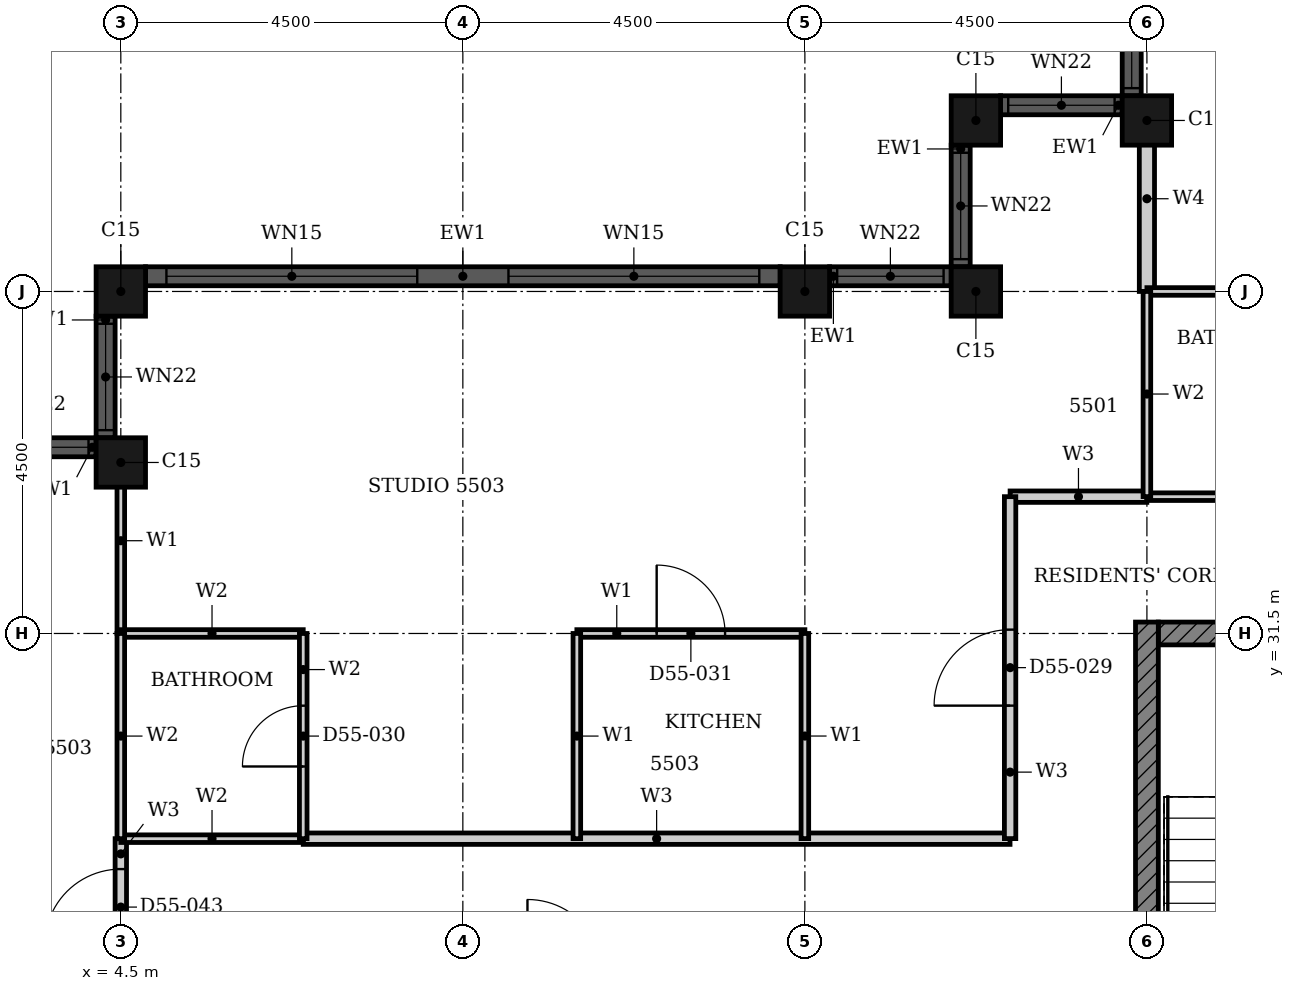
"""IFC4 building model, lengths in metres.
Left out: names, types, materials, properties, quantities, classifications, styles, units other than length and angle.
Written with IfcOpenShell. Run it as: python <this file> out.ifc"""

import sys

from ifc_helpers import new_model, si_unit, direction, frame, frame_2d, origin, origin_2d, place, context, subcontext, project, spatial, rectangle, hollow_rectangle, extrude, element, fill, save


model = new_model("IFC4")
c1 = context("Model", 3, precision=1e-05, world=origin(), true_north=direction((0.0, 1.0)))
c2 = subcontext(c1, "Body", "Model", "MODEL_VIEW")
j1 = project(units=[si_unit("LENGTHUNIT", "METRE"), si_unit("PLANEANGLEUNIT", "RADIAN")], contexts=[c1])
p1 = place(None, origin())
s1 = spatial("IfcSite", under=j1, at=p1, CompositionType="ELEMENT")
p2 = place(p1, origin())
s2 = spatial("IfcBuilding", under=s1, at=p2, CompositionType="ELEMENT")
p3 = place(p2, frame((0.0, 0.0, 218.3)))
s3 = spatial("IfcBuildingStorey", under=s2, at=p3, CompositionType="ELEMENT", Elevation=218.3)
for number, where, z_axis, x_axis in (
    (1, (18.0, 38.25, 0.0), (0.0, 0.0, 1.0), (1.0, 0.0, 0.0)),
    (2, (15.75, 38.25, 0.0), (0.0, 0.0, 1.0), (1.0, 0.0, 0.0)),
    (3, (15.75, 36.0, 0.0), (0.0, 0.0, 1.0), (1.0, 0.0, 0.0)),
    (4, (13.5, 36.0, 0.0), (0.0, 0.0, 1.0), (1.0, 0.0, 0.0)),
    (5, (4.5, 36.0, 0.0), (0.0, 0.0, 1.0), (1.0, 0.0, 0.0)),
    (6, (4.5, 33.75, 0.0), (0.0, 0.0, 1.0), (1.0, 0.0, 0.0)),
):
    element("IfcColumn", number, at=place(p3, frame(where, z_axis=z_axis, x_axis=x_axis)), inside=s3, PredefinedType="COLUMN", context=c2, shape_type="SweptSolid", body=[
        extrude(hollow_rectangle(XDim=0.65, YDim=0.65, WallThickness=0.021, at=origin_2d()), origin(), (0.0, 0.0, 1.0), 3.7),
    ])
p4 = place(p3, frame((17.8, 40.175, 0.0), z_axis=(0.0, 0.0, 1.0), x_axis=(0.0, -1.0, 0.0)))
e7 = element("IfcWall", 7, at=p4, inside=s3, PredefinedType="SOLIDWALL", context=c2, shape_type="SweptSolid", body=[
    extrude(rectangle(XDim=1.6, YDim=0.25, at=frame_2d((0.8, 0.0))), origin(), (0.0, 0.0, 1.0), 3.7),
])
p5 = place(p4, frame((0.1, 0.0, 0.9)))
e8 = element("IfcOpeningElement", 8, at=p5, cuts=e7, PredefinedType="OPENING", context=c2, shape_type="SweptSolid", body=[
    extrude(rectangle(XDim=1.4, YDim=1.85, at=frame_2d((0.7, 0.925))), frame((0.0, 0.135, 0.0), z_axis=(0.0, -1.0, 0.0), x_axis=(1.0, 0.0, 0.0)), (0.0, 0.0, 1.0), 0.27),
])
p6 = place(p3, frame((17.675, 38.45, 0.0), z_axis=(0.0, 0.0, 1.0), x_axis=(-1.0, 0.0, 0.0)))
e9 = element("IfcWall", 9, at=p6, inside=s3, PredefinedType="SOLIDWALL", context=c2, shape_type="SweptSolid", body=[
    extrude(rectangle(XDim=1.6, YDim=0.25, at=frame_2d((0.8, 0.0))), origin(), (0.0, 0.0, 1.0), 3.7),
])
p7 = place(p6, frame((0.1, 0.0, 0.9)))
e10 = element("IfcOpeningElement", 10, at=p7, cuts=e9, PredefinedType="OPENING", context=c2, shape_type="SweptSolid", body=[
    extrude(rectangle(XDim=1.4, YDim=1.85, at=frame_2d((0.7, 0.925))), frame((0.0, 0.135, 0.0), z_axis=(0.0, -1.0, 0.0), x_axis=(1.0, 0.0, 0.0)), (0.0, 0.0, 1.0), 0.27),
])
p8 = place(p3, frame((15.55, 37.925, 0.0), z_axis=(0.0, 0.0, 1.0), x_axis=(0.0, -1.0, 0.0)))
e11 = element("IfcWall", 11, at=p8, inside=s3, PredefinedType="SOLIDWALL", context=c2, shape_type="SweptSolid", body=[
    extrude(rectangle(XDim=1.6, YDim=0.25, at=frame_2d((0.8, 0.0))), origin(), (0.0, 0.0, 1.0), 3.7),
])
p9 = place(p8, frame((0.1, 0.0, 0.9)))
e12 = element("IfcOpeningElement", 12, at=p9, cuts=e11, PredefinedType="OPENING", context=c2, shape_type="SweptSolid", body=[
    extrude(rectangle(XDim=1.4, YDim=1.85, at=frame_2d((0.7, 0.925))), frame((0.0, 0.135, 0.0), z_axis=(0.0, -1.0, 0.0), x_axis=(1.0, 0.0, 0.0)), (0.0, 0.0, 1.0), 0.27),
])
p10 = place(p3, frame((15.425, 36.2, 0.0), z_axis=(0.0, 0.0, 1.0), x_axis=(-1.0, 0.0, 0.0)))
e13 = element("IfcWall", 13, at=p10, inside=s3, PredefinedType="SOLIDWALL", context=c2, shape_type="SweptSolid", body=[
    extrude(rectangle(XDim=1.6, YDim=0.25, at=frame_2d((0.8, 0.0))), origin(), (0.0, 0.0, 1.0), 3.7),
])
p11 = place(p10, frame((0.1, 0.0, 0.9)))
e14 = element("IfcOpeningElement", 14, at=p11, cuts=e13, PredefinedType="OPENING", context=c2, shape_type="SweptSolid", body=[
    extrude(rectangle(XDim=1.4, YDim=1.85, at=frame_2d((0.7, 0.925))), frame((0.0, 0.135, 0.0), z_axis=(0.0, -1.0, 0.0), x_axis=(1.0, 0.0, 0.0)), (0.0, 0.0, 1.0), 0.27),
])
p12 = place(p3, frame((13.175, 36.2, 0.0), z_axis=(0.0, 0.0, 1.0), x_axis=(-1.0, 0.0, 0.0)))
e15 = element("IfcWall", 15, at=p12, inside=s3, PredefinedType="SOLIDWALL", context=c2, shape_type="SweptSolid", body=[
    extrude(rectangle(XDim=8.35, YDim=0.25, at=frame_2d((4.175, 0.0))), origin(), (0.0, 0.0, 1.0), 3.7),
])
p13 = place(p12, frame((0.275, 0.0, 0.45)))
e16 = element("IfcOpeningElement", 16, at=p13, cuts=e15, PredefinedType="OPENING", context=c2, shape_type="SweptSolid", body=[
    extrude(rectangle(XDim=3.3, YDim=2.3, at=frame_2d((1.65, 1.15))), frame((0.0, 0.135, 0.0), z_axis=(0.0, -1.0, 0.0), x_axis=(1.0, 0.0, 0.0)), (0.0, 0.0, 1.0), 0.27),
])
p14 = place(p12, frame((4.775, 0.0, 0.45)))
e17 = element("IfcOpeningElement", 17, at=p14, cuts=e15, PredefinedType="OPENING", context=c2, shape_type="SweptSolid", body=[
    extrude(rectangle(XDim=3.3, YDim=2.3, at=frame_2d((1.65, 1.15))), frame((0.0, 0.135, 0.0), z_axis=(0.0, -1.0, 0.0), x_axis=(1.0, 0.0, 0.0)), (0.0, 0.0, 1.0), 0.27),
])
p15 = place(p3, frame((4.3, 35.675, 0.0), z_axis=(0.0, 0.0, 1.0), x_axis=(0.0, -1.0, 0.0)))
e18 = element("IfcWall", 18, at=p15, inside=s3, PredefinedType="SOLIDWALL", context=c2, shape_type="SweptSolid", body=[
    extrude(rectangle(XDim=1.6, YDim=0.25, at=frame_2d((0.8, 0.0))), origin(), (0.0, 0.0, 1.0), 3.7),
])
p16 = place(p15, frame((0.1, 0.0, 0.9)))
e19 = element("IfcOpeningElement", 19, at=p16, cuts=e18, PredefinedType="OPENING", context=c2, shape_type="SweptSolid", body=[
    extrude(rectangle(XDim=1.4, YDim=1.85, at=frame_2d((0.7, 0.925))), frame((0.0, 0.135, 0.0), z_axis=(0.0, -1.0, 0.0), x_axis=(1.0, 0.0, 0.0)), (0.0, 0.0, 1.0), 0.27),
])
p17 = place(p3, frame((4.175, 33.95, 0.0), z_axis=(0.0, 0.0, 1.0), x_axis=(-1.0, 0.0, 0.0)))
e20 = element("IfcWall", 20, at=p17, inside=s3, PredefinedType="SOLIDWALL", context=c2, shape_type="SweptSolid", body=[
    extrude(rectangle(XDim=1.6, YDim=0.25, at=frame_2d((0.8, 0.0))), origin(), (0.0, 0.0, 1.0), 3.7),
])
p18 = place(p17, frame((0.1, 0.0, 0.9)))
e21 = element("IfcOpeningElement", 21, at=p18, cuts=e20, PredefinedType="OPENING", context=c2, shape_type="SweptSolid", body=[
    extrude(rectangle(XDim=1.4, YDim=1.85, at=frame_2d((0.7, 0.925))), frame((0.0, 0.135, 0.0), z_axis=(0.0, -1.0, 0.0), x_axis=(1.0, 0.0, 0.0)), (0.0, 0.0, 1.0), 0.27),
])
p19 = place(p3, frame((18.15, 31.5, 0.0), z_axis=(0.0, 0.0, 1.0), x_axis=(1.0, 0.0, 0.0)))
e22 = element("IfcWall", 22, at=p19, inside=s3, PredefinedType="SHEAR", context=c2, shape_type="SweptSolid", body=[
    extrude(rectangle(XDim=9.368, YDim=0.3, at=frame_2d((4.684, 0.0))), origin(), (0.0, 0.0, 1.0), 3.4),
])
p20 = place(p19, frame((4.736, 0.0, 0.0)))
e23 = element("IfcOpeningElement", 23, at=p20, cuts=e22, PredefinedType="OPENING", context=c2, shape_type="SweptSolid", body=[
    extrude(rectangle(XDim=1.8, YDim=2.1, at=frame_2d((0.9, 1.05))), frame((0.0, 0.16, 0.0), z_axis=(0.0, -1.0, 0.0), x_axis=(1.0, 0.0, 0.0)), (0.0, 0.0, 1.0), 0.32),
])
p21 = place(p3, frame((18.0, 22.35, 0.0), z_axis=(0.0, 0.0, 1.0), x_axis=(0.0, 1.0, 0.0)))
e24 = element("IfcWall", 24, at=p21, inside=s3, PredefinedType="SHEAR", context=c2, shape_type="SweptSolid", body=[
    extrude(rectangle(XDim=9.3, YDim=0.3, at=frame_2d((4.65, 0.0))), origin(), (0.0, 0.0, 1.0), 3.4),
])
p22 = place(p3, frame((6.9, 28.8, 0.0), z_axis=(0.0, 0.0, 1.0), x_axis=(1.0, 0.0, 0.0)))
e25 = element("IfcWall", 25, at=p22, inside=s3, PredefinedType="PARTITIONING", context=c2, shape_type="SweptSolid", body=[
    extrude(rectangle(XDim=9.299, YDim=0.15, at=frame_2d((4.649, 0.0))), origin(), (0.0, 0.0, 1.0), 3.4),
])
p23 = place(p3, frame((16.2, 33.3, 0.0), z_axis=(0.0, 0.0, 1.0), x_axis=(1.0, 0.0, 0.0)))
e26 = element("IfcWall", 26, at=p23, inside=s3, PredefinedType="PARTITIONING", context=c2, shape_type="SweptSolid", body=[
    extrude(rectangle(XDim=1.799, YDim=0.15, at=frame_2d((0.899, 0.0))), origin(), (0.0, 0.0, 1.0), 3.4),
])
p24 = place(p3, frame((16.2, 28.801, 0.0), z_axis=(0.0, 0.0, 1.0), x_axis=(0.0, 1.0, 0.0)))
e27 = element("IfcWall", 27, at=p24, inside=s3, PredefinedType="PARTITIONING", context=c2, shape_type="SweptSolid", body=[
    extrude(rectangle(XDim=4.499, YDim=0.15, at=frame_2d((2.25, 0.0))), origin(), (0.0, 0.0, 1.0), 3.4),
])
p25 = place(p24, frame((1.75, 0.0, 0.0)))
e28 = element("IfcOpeningElement", 28, at=p25, cuts=e27, PredefinedType="OPENING", context=c2, shape_type="SweptSolid", body=[
    extrude(rectangle(XDim=1.0, YDim=2.2, at=frame_2d((0.5, 1.1))), frame((0.0, 0.085, 0.0), z_axis=(0.0, -1.0, 0.0), x_axis=(1.0, 0.0, 0.0)), (0.0, 0.0, 1.0), 0.17),
])
p26 = place(p3, frame((4.5, 27.0, 0.0), z_axis=(0.0, 0.0, 1.0), x_axis=(0.0, 1.0, 0.0)))
e29 = element("IfcWall", 29, at=p26, inside=s3, PredefinedType="PARTITIONING", context=c2, shape_type="SweptSolid", body=[
    extrude(rectangle(XDim=1.8, YDim=0.15, at=frame_2d((0.9, 0.0))), origin(), (0.0, 0.0, 1.0), 3.4),
])
p27 = place(p26, frame((0.4, 0.0, 0.0)))
e30 = element("IfcOpeningElement", 30, at=p27, cuts=e29, PredefinedType="OPENING", context=c2, shape_type="SweptSolid", body=[
    extrude(rectangle(XDim=1.0, YDim=2.1, at=frame_2d((0.5, 1.05))), frame((0.0, 0.085, 0.0), z_axis=(0.0, -1.0, 0.0), x_axis=(1.0, 0.0, 0.0)), (0.0, 0.0, 1.0), 0.17),
])
p28 = place(p3, frame((10.5, 31.5, 0.0), z_axis=(0.0, 0.0, 1.0), x_axis=(1.0, 0.0, 0.0)))
e31 = element("IfcWall", 31, at=p28, inside=s3, PredefinedType="PARTITIONING", context=c2, shape_type="SweptSolid", body=[
    extrude(rectangle(XDim=3.0, YDim=0.1, at=frame_2d((1.5, 0.0))), origin(), (0.0, 0.0, 1.0), 2.68),
])
p29 = place(p28, frame((1.05, 0.0, 0.0)))
e32 = element("IfcOpeningElement", 32, at=p29, cuts=e31, PredefinedType="OPENING", context=c2, shape_type="SweptSolid", body=[
    extrude(rectangle(XDim=0.9, YDim=2.1, at=frame_2d((0.45, 1.05))), frame((0.0, 0.06, 0.0), z_axis=(0.0, -1.0, 0.0), x_axis=(1.0, 0.0, 0.0)), (0.0, 0.0, 1.0), 0.12),
])
p30 = place(p3, frame((10.5, 28.8, 0.0), z_axis=(0.0, 0.0, 1.0), x_axis=(0.0, 1.0, 0.0)))
e33 = element("IfcWall", 33, at=p30, inside=s3, PredefinedType="PARTITIONING", context=c2, shape_type="SweptSolid", body=[
    extrude(rectangle(XDim=2.7, YDim=0.1, at=frame_2d((1.35, 0.0))), origin(), (0.0, 0.0, 1.0), 3.4),
])
p31 = place(p3, frame((13.5, 28.801, 0.0), z_axis=(0.0, 0.0, 1.0), x_axis=(0.0, 1.0, 0.0)))
e34 = element("IfcWall", 34, at=p31, inside=s3, PredefinedType="PARTITIONING", context=c2, shape_type="SweptSolid", body=[
    extrude(rectangle(XDim=2.699, YDim=0.1, at=frame_2d((1.35, 0.0))), origin(), (0.0, 0.0, 1.0), 2.48),
])
p32 = place(p3, frame((4.5, 31.501, 0.0), z_axis=(0.0, 0.0, 1.0), x_axis=(0.0, 1.0, 0.0)))
e35 = element("IfcWall", 35, at=p32, inside=s3, PredefinedType="PARTITIONING", context=c2, shape_type="SweptSolid", body=[
    extrude(rectangle(XDim=2.439, YDim=0.1, at=frame_2d((1.219, 0.0))), origin(), (0.0, 0.0, 1.0), 3.4),
])
p33 = place(p3, frame((18.0, 36.0, 0.0), z_axis=(0.0, 0.0, 1.0), x_axis=(0.0, 1.0, 0.0)))
e36 = element("IfcWall", 36, at=p33, inside=s3, PredefinedType="PARTITIONING", context=c2, shape_type="SweptSolid", body=[
    extrude(rectangle(XDim=2.44, YDim=0.2, at=frame_2d((1.22, 0.0))), origin(), (0.0, 0.0, 1.0), 3.4),
])
p34 = place(p3, frame((4.5, 28.8, 0.0), z_axis=(0.0, 0.0, 1.0), x_axis=(1.0, 0.0, 0.0)))
e37 = element("IfcWall", 37, at=p34, inside=s3, PredefinedType="PARTITIONING", context=c2, shape_type="SweptSolid", body=[
    extrude(rectangle(XDim=2.4, YDim=0.1, at=frame_2d((1.2, 0.0))), origin(), (0.0, 0.0, 1.0), 3.4),
])
p35 = place(p3, frame((4.5, 31.5, 0.0), z_axis=(0.0, 0.0, 1.0), x_axis=(1.0, 0.0, 0.0)))
e38 = element("IfcWall", 38, at=p35, inside=s3, PredefinedType="PARTITIONING", context=c2, shape_type="SweptSolid", body=[
    extrude(rectangle(XDim=2.4, YDim=0.1, at=frame_2d((1.2, 0.0))), origin(), (0.0, 0.0, 1.0), 2.68),
])
for number, where, z_axis, x_axis in (
    (39, (18.0, 33.3, 0.0), (0.0, 0.0, 1.0), (1.0, 0.0, 0.0)),
    (40, (18.0, 36.0, 0.0), (0.0, 0.0, 1.0), (1.0, 0.0, 0.0)),
):
    element("IfcWall", number, at=place(p3, frame(where, z_axis=z_axis, x_axis=x_axis)), inside=s3, PredefinedType="PARTITIONING", context=c2, shape_type="SweptSolid", body=[
        extrude(rectangle(XDim=2.4, YDim=0.1, at=frame_2d((1.2, 0.0))), origin(), (0.0, 0.0, 1.0), 3.4),
    ])
p36 = place(p3, frame((18.0, 33.301, 0.0), z_axis=(0.0, 0.0, 1.0), x_axis=(0.0, 1.0, 0.0)))
e41 = element("IfcWall", 41, at=p36, inside=s3, PredefinedType="PARTITIONING", context=c2, shape_type="SweptSolid", body=[
    extrude(rectangle(XDim=2.699, YDim=0.1, at=frame_2d((1.35, 0.0))), origin(), (0.0, 0.0, 1.0), 3.4),
])
p37 = place(p3, frame((4.5, 28.8, 0.0), z_axis=(0.0, 0.0, 1.0), x_axis=(0.0, 1.0, 0.0)))
e42 = element("IfcWall", 42, at=p37, inside=s3, PredefinedType="PARTITIONING", context=c2, shape_type="SweptSolid", body=[
    extrude(rectangle(XDim=2.7, YDim=0.1, at=frame_2d((1.35, 0.0))), origin(), (0.0, 0.0, 1.0), 3.4),
])
p38 = place(p3, frame((6.9, 28.8, 0.0), z_axis=(0.0, 0.0, 1.0), x_axis=(0.0, 1.0, 0.0)))
e43 = element("IfcWall", 43, at=p38, inside=s3, PredefinedType="PARTITIONING", context=c2, shape_type="SweptSolid", body=[
    extrude(rectangle(XDim=2.7, YDim=0.1, at=frame_2d((1.35, 0.0))), origin(), (0.0, 0.0, 1.0), 3.4),
])
p39 = place(p38, frame((0.95, 0.0, 0.0)))
e44 = element("IfcOpeningElement", 44, at=p39, cuts=e43, PredefinedType="OPENING", context=c2, shape_type="SweptSolid", body=[
    extrude(rectangle(XDim=0.8, YDim=2.1, at=frame_2d((0.4, 1.05))), frame((0.0, 0.06, 0.0), z_axis=(0.0, -1.0, 0.0), x_axis=(1.0, 0.0, 0.0)), (0.0, 0.0, 1.0), 0.12),
])
p40 = place(p5, origin())
e45 = element("IfcWindow", 45, at=p40, inside=s3, PartitioningType="SINGLE_PANEL", PredefinedType="WINDOW", context=c2, shape_type="SweptSolid", body=[
    extrude(rectangle(XDim=1.4, YDim=1.85, at=frame_2d((0.7, 0.925))), frame((0.0, 0.03, 0.0), z_axis=(0.0, -1.0, 0.0), x_axis=(1.0, 0.0, 0.0)), (0.0, 0.0, 1.0), 0.06),
])
fill(e8, e45)
p41 = place(p7, origin())
e46 = element("IfcWindow", 46, at=p41, inside=s3, PartitioningType="SINGLE_PANEL", PredefinedType="WINDOW", context=c2, shape_type="SweptSolid", body=[
    extrude(rectangle(XDim=1.4, YDim=1.85, at=frame_2d((0.7, 0.925))), frame((0.0, 0.03, 0.0), z_axis=(0.0, -1.0, 0.0), x_axis=(1.0, 0.0, 0.0)), (0.0, 0.0, 1.0), 0.06),
])
fill(e10, e46)
p42 = place(p9, origin())
e47 = element("IfcWindow", 47, at=p42, inside=s3, PartitioningType="SINGLE_PANEL", PredefinedType="WINDOW", context=c2, shape_type="SweptSolid", body=[
    extrude(rectangle(XDim=1.4, YDim=1.85, at=frame_2d((0.7, 0.925))), frame((0.0, 0.03, 0.0), z_axis=(0.0, -1.0, 0.0), x_axis=(1.0, 0.0, 0.0)), (0.0, 0.0, 1.0), 0.06),
])
fill(e12, e47)
p43 = place(p11, origin())
e48 = element("IfcWindow", 48, at=p43, inside=s3, PartitioningType="SINGLE_PANEL", PredefinedType="WINDOW", context=c2, shape_type="SweptSolid", body=[
    extrude(rectangle(XDim=1.4, YDim=1.85, at=frame_2d((0.7, 0.925))), frame((0.0, 0.03, 0.0), z_axis=(0.0, -1.0, 0.0), x_axis=(1.0, 0.0, 0.0)), (0.0, 0.0, 1.0), 0.06),
])
fill(e14, e48)
p44 = place(p13, origin())
e49 = element("IfcWindow", 49, at=p44, inside=s3, PartitioningType="SINGLE_PANEL", PredefinedType="WINDOW", context=c2, shape_type="SweptSolid", body=[
    extrude(rectangle(XDim=3.3, YDim=2.3, at=frame_2d((1.65, 1.15))), frame((0.0, 0.03, 0.0), z_axis=(0.0, -1.0, 0.0), x_axis=(1.0, 0.0, 0.0)), (0.0, 0.0, 1.0), 0.06),
])
fill(e16, e49)
p45 = place(p14, origin())
e50 = element("IfcWindow", 50, at=p45, inside=s3, PartitioningType="SINGLE_PANEL", PredefinedType="WINDOW", context=c2, shape_type="SweptSolid", body=[
    extrude(rectangle(XDim=3.3, YDim=2.3, at=frame_2d((1.65, 1.15))), frame((0.0, 0.03, 0.0), z_axis=(0.0, -1.0, 0.0), x_axis=(1.0, 0.0, 0.0)), (0.0, 0.0, 1.0), 0.06),
])
fill(e17, e50)
p46 = place(p16, origin())
e51 = element("IfcWindow", 51, at=p46, inside=s3, PartitioningType="SINGLE_PANEL", PredefinedType="WINDOW", context=c2, shape_type="SweptSolid", body=[
    extrude(rectangle(XDim=1.4, YDim=1.85, at=frame_2d((0.7, 0.925))), frame((0.0, 0.03, 0.0), z_axis=(0.0, -1.0, 0.0), x_axis=(1.0, 0.0, 0.0)), (0.0, 0.0, 1.0), 0.06),
])
fill(e19, e51)
p47 = place(p18, origin())
e52 = element("IfcWindow", 52, at=p47, inside=s3, PartitioningType="SINGLE_PANEL", PredefinedType="WINDOW", context=c2, shape_type="SweptSolid", body=[
    extrude(rectangle(XDim=1.4, YDim=1.85, at=frame_2d((0.7, 0.925))), frame((0.0, 0.03, 0.0), z_axis=(0.0, -1.0, 0.0), x_axis=(1.0, 0.0, 0.0)), (0.0, 0.0, 1.0), 0.06),
])
fill(e21, e52)
p48 = place(p25, origin())
e53 = element("IfcDoor", 53, at=p48, inside=s3, OperationType="SINGLE_SWING_LEFT", PredefinedType="DOOR", context=c2, shape_type="SweptSolid", body=[
    extrude(rectangle(XDim=1.0, YDim=2.2, at=frame_2d((0.5, 1.1))), frame((0.0, 0.025, 0.0), z_axis=(0.0, -1.0, 0.0), x_axis=(1.0, 0.0, 0.0)), (0.0, 0.0, 1.0), 0.05),
])
fill(e28, e53)
p49 = place(p39, origin())
e54 = element("IfcDoor", 54, at=p49, inside=s3, OperationType="SINGLE_SWING_LEFT", PredefinedType="DOOR", context=c2, shape_type="SweptSolid", body=[
    extrude(rectangle(XDim=0.8, YDim=2.1, at=frame_2d((0.4, 1.05))), frame((0.0, 0.025, 0.0), z_axis=(0.0, -1.0, 0.0), x_axis=(1.0, 0.0, 0.0)), (0.0, 0.0, 1.0), 0.05),
])
fill(e44, e54)
p50 = place(p29, origin())
e55 = element("IfcDoor", 55, at=p50, inside=s3, OperationType="SINGLE_SWING_LEFT", PredefinedType="DOOR", context=c2, shape_type="SweptSolid", body=[
    extrude(rectangle(XDim=0.9, YDim=2.1, at=frame_2d((0.45, 1.05))), frame((0.0, 0.025, 0.0), z_axis=(0.0, -1.0, 0.0), x_axis=(1.0, 0.0, 0.0)), (0.0, 0.0, 1.0), 0.05),
])
fill(e32, e55)
p51 = place(p27, origin())
e56 = element("IfcDoor", 56, at=p51, inside=s3, OperationType="SINGLE_SWING_RIGHT", PredefinedType="DOOR", context=c2, shape_type="SweptSolid", body=[
    extrude(rectangle(XDim=1.0, YDim=2.1, at=frame_2d((0.5, 1.05))), frame((0.0, 0.025, 0.0), z_axis=(0.0, -1.0, 0.0), x_axis=(1.0, 0.0, 0.0)), (0.0, 0.0, 1.0), 0.05),
])
fill(e30, e56)
save(model, sys.argv[1])
